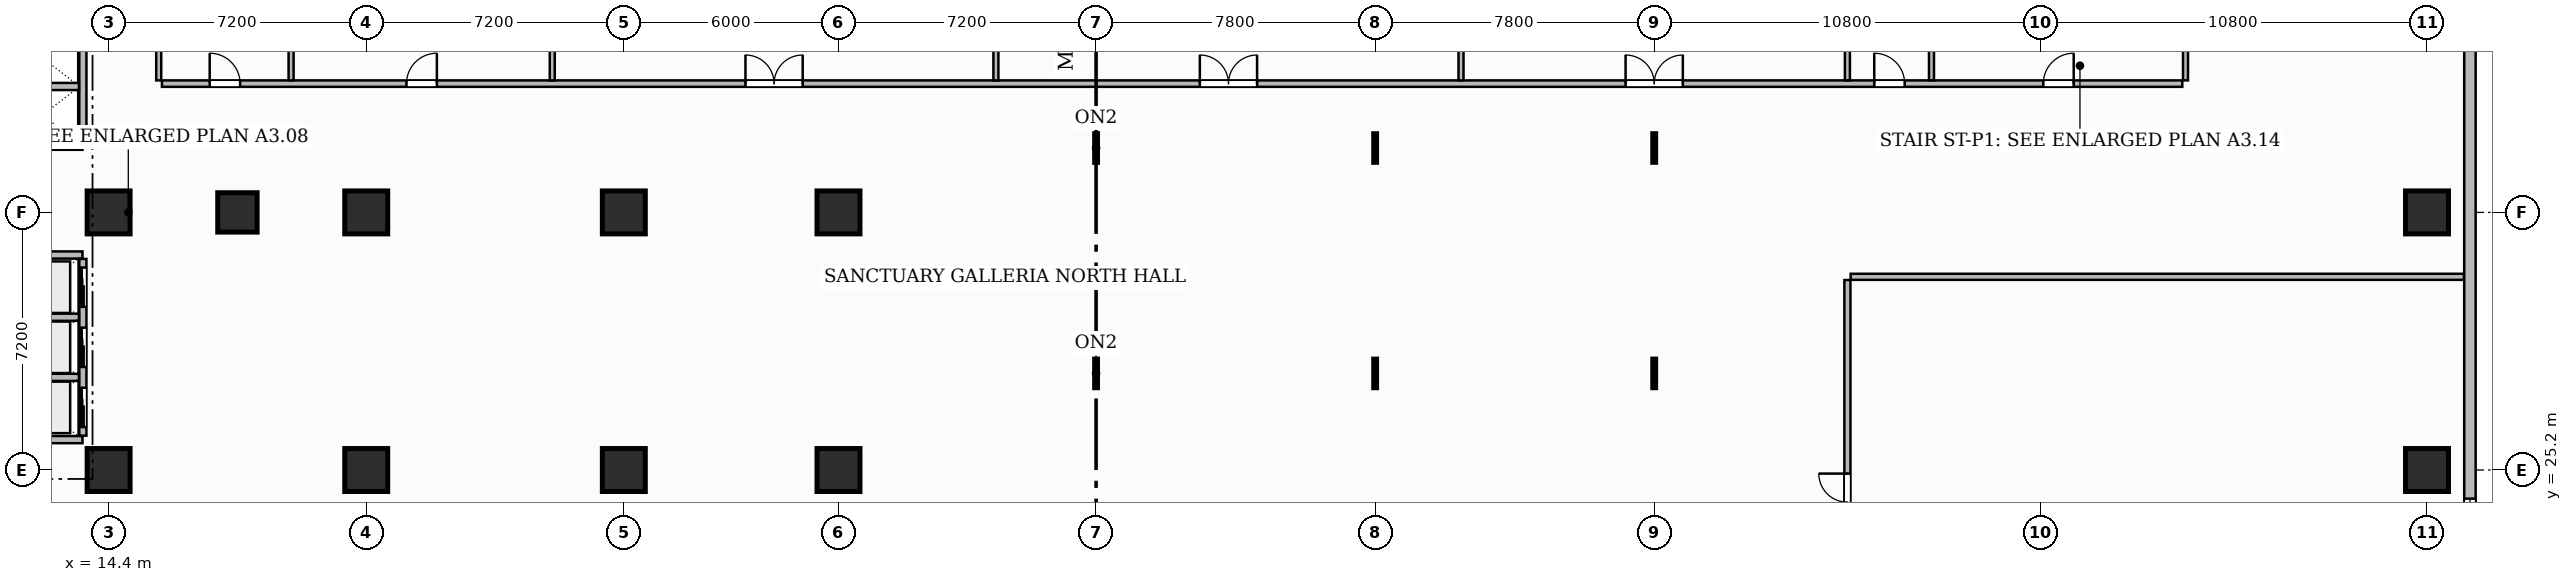
"""IFC4 building model, lengths in metres.
Left out: names, types, materials, properties, quantities, classifications, styles, units other than length and angle.
Written with IfcOpenShell. Run it as: python <this file> out.ifc"""

import sys

from ifc_helpers import new_model, si_unit, direction, frame, frame_2d, origin, origin_2d, place, context, subcontext, project, spatial, rectangle, extrude, source, transform, mapped, element, fill, save


model = new_model("IFC4")
c1 = context("Model", 3, precision=1e-05, world=origin(), true_north=direction((0.0, 1.0)))
c2 = subcontext(c1, "Body", "Model", "MODEL_VIEW")
j1 = project(units=[si_unit("LENGTHUNIT", "METRE"), si_unit("PLANEANGLEUNIT", "RADIAN")], contexts=[c1])
p1 = place(None, origin())
s1 = spatial("IfcSite", under=j1, at=p1, CompositionType="ELEMENT")
p2 = place(p1, origin())
s2 = spatial("IfcBuilding", under=s1, at=p2, CompositionType="ELEMENT")
p3 = place(p2, frame((0.0, 0.0, 21.6)))
s3 = spatial("IfcBuildingStorey", under=s2, at=p3, CompositionType="ELEMENT", Elevation=21.6)
m1 = source(origin(), c2, "Body", "SweptSolid", [
    extrude(rectangle(XDim=1.2, YDim=1.2, at=origin_2d()), origin(), (0.0, 0.0, 1.0), 5.4),
])
for number, where, z_axis, x_axis in (
    (1, (14.4, 25.2, 0.0), (0.0, 0.0, 1.0), (1.0, 0.0, 0.0)),
    (2, (14.4, 32.4, 0.0), (0.0, 0.0, 1.0), (1.0, 0.0, 0.0)),
    (3, (21.6, 25.2, 0.0), (0.0, 0.0, 1.0), (1.0, 0.0, 0.0)),
    (4, (21.6, 32.4, 0.0), (0.0, 0.0, 1.0), (1.0, 0.0, 0.0)),
    (5, (28.8, 25.2, 0.0), (0.0, 0.0, 1.0), (1.0, 0.0, 0.0)),
    (6, (28.8, 32.4, 0.0), (0.0, 0.0, 1.0), (1.0, 0.0, 0.0)),
    (7, (34.8, 25.2, 0.0), (0.0, 0.0, 1.0), (1.0, 0.0, 0.0)),
    (8, (34.8, 32.4, 0.0), (0.0, 0.0, 1.0), (1.0, 0.0, 0.0)),
    (9, (79.2, 25.2, 0.0), (0.0, 0.0, 1.0), (1.0, 0.0, 0.0)),
    (10, (79.2, 32.4, 0.0), (0.0, 0.0, 1.0), (1.0, 0.0, 0.0)),
):
    element("IfcColumn", number, at=place(p3, frame(where, z_axis=z_axis, x_axis=x_axis)), inside=s3, PredefinedType="COLUMN", context=c2, shape_type="MappedRepresentation", body=[
        mapped(m1, transform((0.0, 0.0, 0.0), scale=1.0)),
    ])
m2 = source(origin(), c2, "Body", "SweptSolid", [
    extrude(rectangle(XDim=1.1, YDim=1.1, at=origin_2d()), origin(), (0.0, 0.0, 1.0), 5.4),
])
p4 = place(p3, frame((18.0, 32.4, 0.0), z_axis=(0.0, 0.0, 1.0), x_axis=(1.0, 0.0, 0.0)))
e11 = element("IfcColumn", 11, at=p4, inside=s3, PredefinedType="COLUMN", context=c2, shape_type="MappedRepresentation", body=[
    mapped(m2, transform((0.0, 0.0, 0.0), scale=1.0)),
])
for number, where, z_axis, x_axis in (
    (12, (11.71, 26.05, 0.0), (0.0, 0.0, 1.0), (1.0, 0.0, 0.0)),
    (13, (11.71, 31.21, 0.0), (0.0, 0.0, 1.0), (1.0, 0.0, 0.0)),
):
    element("IfcWall", number, at=place(p3, frame(where, z_axis=z_axis, x_axis=x_axis)), inside=s3, PredefinedType="PARTITIONING", context=c2, shape_type="SweptSolid", body=[
        extrude(rectangle(XDim=1.96, YDim=0.2, at=frame_2d((0.98, 0.0))), origin(), (0.0, 0.0, 1.0), 5.1),
    ])
p5 = place(p3, frame((13.68, 26.16, 0.0), z_axis=(0.0, 0.0, 1.0), x_axis=(0.0, 1.0, 0.0)))
e14 = element("IfcWall", 14, at=p5, inside=s3, PredefinedType="PARTITIONING", context=c2, shape_type="SweptSolid", body=[
    extrude(rectangle(XDim=4.94, YDim=0.2, at=frame_2d((2.47, 0.0))), origin(), (0.0, 0.0, 1.0), 5.1),
])
p6 = place(p5, frame((0.24, 0.0, 0.0)))
e15 = element("IfcOpeningElement", 15, at=p6, cuts=e14, PredefinedType="OPENING", context=c2, shape_type="SweptSolid", body=[
    extrude(rectangle(XDim=1.1, YDim=2.2, at=frame_2d((0.55, 1.1))), frame((0.0, 0.11, 0.0), z_axis=(0.0, -1.0, 0.0), x_axis=(1.0, 0.0, 0.0)), (0.0, 0.0, 1.0), 0.22),
])
p7 = place(p5, frame((1.92, 0.0, 0.0)))
e16 = element("IfcOpeningElement", 16, at=p7, cuts=e14, PredefinedType="OPENING", context=c2, shape_type="SweptSolid", body=[
    extrude(rectangle(XDim=1.1, YDim=2.2, at=frame_2d((0.55, 1.1))), frame((0.0, 0.11, 0.0), z_axis=(0.0, -1.0, 0.0), x_axis=(1.0, 0.0, 0.0)), (0.0, 0.0, 1.0), 0.22),
])
p8 = place(p5, frame((3.6, 0.0, 0.0)))
e17 = element("IfcOpeningElement", 17, at=p8, cuts=e14, PredefinedType="OPENING", context=c2, shape_type="SweptSolid", body=[
    extrude(rectangle(XDim=1.1, YDim=2.2, at=frame_2d((0.55, 1.1))), frame((0.0, 0.11, 0.0), z_axis=(0.0, -1.0, 0.0), x_axis=(1.0, 0.0, 0.0)), (0.0, 0.0, 1.0), 0.22),
])
for number, where, z_axis, x_axis in (
    (18, (11.81, 27.79, 0.0), (0.0, 0.0, 1.0), (1.0, 0.0, 0.0)),
    (19, (11.81, 29.47, 0.0), (0.0, 0.0, 1.0), (1.0, 0.0, 0.0)),
):
    element("IfcWall", number, at=place(p3, frame(where, z_axis=z_axis, x_axis=x_axis)), inside=s3, PredefinedType="PARTITIONING", context=c2, shape_type="SweptSolid", body=[
        extrude(rectangle(XDim=1.76, YDim=0.2, at=frame_2d((0.88, 0.0))), origin(), (0.0, 0.0, 1.0), 5.1),
    ])
p9 = place(p3, frame((11.71, 34.25, 0.0), z_axis=(0.0, 0.0, 1.0), x_axis=(1.0, 0.0, 0.0)))
e20 = element("IfcWall", 20, at=p9, inside=s3, PredefinedType="PARTITIONING", context=c2, shape_type="SweptSolid", body=[
    extrude(rectangle(XDim=1.96, YDim=0.2, at=frame_2d((0.98, 0.0))), origin(), (0.0, 0.0, 1.0), 5.1),
])
p10 = place(p3, frame((13.68, 34.36, 0.0), z_axis=(0.0, 0.0, 1.0), x_axis=(0.0, 1.0, 0.0)))
e21 = element("IfcWall", 21, at=p10, inside=s3, PredefinedType="PARTITIONING", context=c2, shape_type="SweptSolid", body=[
    extrude(rectangle(XDim=4.72, YDim=0.2, at=frame_2d((2.36, 0.0))), origin(), (0.0, 0.0, 1.0), 5.1),
])
p11 = place(p3, frame((11.81, 35.92, 0.0), z_axis=(0.0, 0.0, 1.0), x_axis=(1.0, 0.0, 0.0)))
e22 = element("IfcWall", 22, at=p11, inside=s3, PredefinedType="PARTITIONING", context=c2, shape_type="SweptSolid", body=[
    extrude(rectangle(XDim=1.76, YDim=0.2, at=frame_2d((0.88, 0.0))), origin(), (0.0, 0.0, 1.0), 5.1),
])
p12 = place(p3, frame((15.8, 36.09, 0.0), z_axis=(0.0, 0.0, 1.0), x_axis=(0.0, 1.0, 0.0)))
e23 = element("IfcWall", 23, at=p12, inside=s3, PredefinedType="PARTITIONING", context=c2, shape_type="SweptSolid", body=[
    extrude(rectangle(XDim=10.542, YDim=0.14, at=frame_2d((5.271, 0.0))), origin(), (0.0, 0.0, 1.0), 5.1),
])
p13 = place(p3, frame((72.45, 36.09, 0.0), z_axis=(0.0, 0.0, 1.0), x_axis=(0.0, 1.0, 0.0)))
e24 = element("IfcWall", 24, at=p13, inside=s3, PredefinedType="PARTITIONING", context=c2, shape_type="SweptSolid", body=[
    extrude(rectangle(XDim=3.29, YDim=0.14, at=frame_2d((1.645, 0.0))), origin(), (0.0, 0.0, 1.0), 5.1),
])
p14 = place(p3, frame((15.89, 36.0, 0.0), z_axis=(0.0, 0.0, 1.0), x_axis=(1.0, 0.0, 0.0)))
e25 = element("IfcWall", 25, at=p14, inside=s3, PredefinedType="PARTITIONING", context=c2, shape_type="SweptSolid", body=[
    extrude(rectangle(XDim=56.47, YDim=0.18, at=frame_2d((28.235, 0.0))), origin(), (0.0, 0.0, 1.0), 2.85),
])
p15 = place(p14, frame((1.335, 0.0, 0.0)))
e26 = element("IfcOpeningElement", 26, at=p15, cuts=e25, PredefinedType="OPENING", context=c2, shape_type="SweptSolid", body=[
    extrude(rectangle(XDim=0.85, YDim=2.1, at=frame_2d((0.425, 1.05))), frame((0.0, 0.1, 0.0), z_axis=(0.0, -1.0, 0.0), x_axis=(1.0, 0.0, 0.0)), (0.0, 0.0, 1.0), 0.2),
])
p16 = place(p14, frame((6.835, 0.0, 0.0)))
e27 = element("IfcOpeningElement", 27, at=p16, cuts=e25, PredefinedType="OPENING", context=c2, shape_type="SweptSolid", body=[
    extrude(rectangle(XDim=0.85, YDim=2.1, at=frame_2d((0.425, 1.05))), frame((0.0, 0.1, 0.0), z_axis=(0.0, -1.0, 0.0), x_axis=(1.0, 0.0, 0.0)), (0.0, 0.0, 1.0), 0.2),
])
p17 = place(p14, frame((16.31, 0.0, 0.0)))
e28 = element("IfcOpeningElement", 28, at=p17, cuts=e25, PredefinedType="OPENING", context=c2, shape_type="SweptSolid", body=[
    extrude(rectangle(XDim=1.6, YDim=2.4, at=frame_2d((0.8, 1.2))), frame((0.0, 0.1, 0.0), z_axis=(0.0, -1.0, 0.0), x_axis=(1.0, 0.0, 0.0)), (0.0, 0.0, 1.0), 0.2),
])
p18 = place(p14, frame((29.01, 0.0, 0.0)))
e29 = element("IfcOpeningElement", 29, at=p18, cuts=e25, PredefinedType="OPENING", context=c2, shape_type="SweptSolid", body=[
    extrude(rectangle(XDim=1.6, YDim=2.4, at=frame_2d((0.8, 1.2))), frame((0.0, 0.1, 0.0), z_axis=(0.0, -1.0, 0.0), x_axis=(1.0, 0.0, 0.0)), (0.0, 0.0, 1.0), 0.2),
])
p19 = place(p14, frame((40.91, 0.0, 0.0)))
e30 = element("IfcOpeningElement", 30, at=p19, cuts=e25, PredefinedType="OPENING", context=c2, shape_type="SweptSolid", body=[
    extrude(rectangle(XDim=1.6, YDim=2.4, at=frame_2d((0.8, 1.2))), frame((0.0, 0.1, 0.0), z_axis=(0.0, -1.0, 0.0), x_axis=(1.0, 0.0, 0.0)), (0.0, 0.0, 1.0), 0.2),
])
p20 = place(p14, frame((47.86, 0.0, 0.0)))
e31 = element("IfcOpeningElement", 31, at=p20, cuts=e25, PredefinedType="OPENING", context=c2, shape_type="SweptSolid", body=[
    extrude(rectangle(XDim=0.85, YDim=2.1, at=frame_2d((0.425, 1.05))), frame((0.0, 0.1, 0.0), z_axis=(0.0, -1.0, 0.0), x_axis=(1.0, 0.0, 0.0)), (0.0, 0.0, 1.0), 0.2),
])
p21 = place(p14, frame((52.585, 0.0, 0.0)))
e32 = element("IfcOpeningElement", 32, at=p21, cuts=e25, PredefinedType="OPENING", context=c2, shape_type="SweptSolid", body=[
    extrude(rectangle(XDim=0.85, YDim=2.1, at=frame_2d((0.425, 1.05))), frame((0.0, 0.1, 0.0), z_axis=(0.0, -1.0, 0.0), x_axis=(1.0, 0.0, 0.0)), (0.0, 0.0, 1.0), 0.2),
])
for number, where, z_axis, x_axis in (
    (33, (19.5, 36.09, 0.0), (0.0, 0.0, 1.0), (0.0, 1.0, 0.0)),
    (34, (26.8, 36.09, 0.0), (0.0, 0.0, 1.0), (0.0, 1.0, 0.0)),
):
    element("IfcWall", number, at=place(p3, frame(where, z_axis=z_axis, x_axis=x_axis)), inside=s3, PredefinedType="PARTITIONING", context=c2, shape_type="SweptSolid", body=[
        extrude(rectangle(XDim=10.542, YDim=0.14, at=frame_2d((5.271, 0.0))), origin(), (0.0, 0.0, 1.0), 5.1),
    ])
p22 = place(p3, frame((39.2, 36.09, 0.0), z_axis=(0.0, 0.0, 1.0), x_axis=(0.0, 1.0, 0.0)))
e35 = element("IfcWall", 35, at=p22, inside=s3, PredefinedType="PARTITIONING", context=c2, shape_type="SweptSolid", body=[
    extrude(rectangle(XDim=10.682, YDim=0.14, at=frame_2d((5.341, 0.0))), origin(), (0.0, 0.0, 1.0), 5.1),
])
for number, where, z_axis, x_axis in (
    (36, (52.2, 36.09, 0.0), (0.0, 0.0, 1.0), (0.0, 1.0, 0.0)),
    (37, (63.0, 36.09, 0.0), (0.0, 0.0, 1.0), (0.0, 1.0, 0.0)),
    (38, (65.35, 36.09, 0.0), (0.0, 0.0, 1.0), (0.0, 1.0, 0.0)),
):
    element("IfcWall", number, at=place(p3, frame(where, z_axis=z_axis, x_axis=x_axis)), inside=s3, PredefinedType="PARTITIONING", context=c2, shape_type="SweptSolid", body=[
        extrude(rectangle(XDim=10.542, YDim=0.14, at=frame_2d((5.271, 0.0))), origin(), (0.0, 0.0, 1.0), 5.1),
    ])
p23 = place(p3, frame((63.0, 18.09, 0.0), z_axis=(0.0, 0.0, 1.0), x_axis=(0.0, 1.0, 0.0)))
e39 = element("IfcWall", 39, at=p23, inside=s3, PredefinedType="PARTITIONING", context=c2, shape_type="SweptSolid", body=[
    extrude(rectangle(XDim=12.42, YDim=0.17, at=frame_2d((6.21, 0.0))), origin(), (0.0, 0.0, 1.0), 5.1),
])
p24 = place(p23, frame((5.41, 0.0, 0.0)))
e40 = element("IfcOpeningElement", 40, at=p24, cuts=e39, PredefinedType="OPENING", context=c2, shape_type="SweptSolid", body=[
    extrude(rectangle(XDim=1.6, YDim=2.4, at=frame_2d((0.8, 1.2))), frame((0.0, 0.095, 0.0), z_axis=(0.0, -1.0, 0.0), x_axis=(1.0, 0.0, 0.0)), (0.0, 0.0, 1.0), 0.19),
])
p25 = place(p3, frame((63.09, 30.6, 0.0), z_axis=(0.0, 0.0, 1.0), x_axis=(1.0, 0.0, 0.0)))
e41 = element("IfcWall", 41, at=p25, inside=s3, PredefinedType="PARTITIONING", context=c2, shape_type="SweptSolid", body=[
    extrude(rectangle(XDim=17.142, YDim=0.17, at=frame_2d((8.571, 0.0))), origin(), (0.0, 0.0, 1.0), 5.1),
])
p26 = place(p3, frame((80.4, 0.05, 0.0), z_axis=(0.0, 0.0, 1.0), x_axis=(0.0, 1.0, 0.0)))
e42 = element("IfcWall", 42, at=p26, inside=s3, PredefinedType="SOLIDWALL", context=c2, shape_type="SweptSolid", body=[
    extrude(rectangle(XDim=46.7, YDim=0.32, at=frame_2d((23.35, 0.0))), origin(), (0.0, 0.0, 1.0), 5.1),
])
p27 = place(p26, frame((22.35, 0.0, 0.75)))
e43 = element("IfcOpeningElement", 43, at=p27, cuts=e42, PredefinedType="OPENING", context=c2, shape_type="SweptSolid", body=[
    extrude(rectangle(XDim=2.0, YDim=2.6, at=frame_2d((1.0, 1.3))), frame((0.0, 0.17, 0.0), z_axis=(0.0, -1.0, 0.0), x_axis=(1.0, 0.0, 0.0)), (0.0, 0.0, 1.0), 0.34),
])
m3 = source(origin(), c2, "Body", "SweptSolid", [
    extrude(rectangle(XDim=0.85, YDim=2.1, at=frame_2d((0.425, 1.05))), frame((0.0, 0.025, 0.0), z_axis=(0.0, -1.0, 0.0), x_axis=(1.0, 0.0, 0.0)), (0.0, 0.0, 1.0), 0.05),
])
p28 = place(p15, origin())
e44 = element("IfcDoor", 44, at=p28, inside=s3, OperationType="SINGLE_SWING_LEFT", PredefinedType="DOOR", context=c2, shape_type="MappedRepresentation", body=[
    mapped(m3, transform((0.0, 0.0, 0.0), scale=1.0)),
])
fill(e26, e44)
p29 = place(p16, origin())
e45 = element("IfcDoor", 45, at=p29, inside=s3, OperationType="SINGLE_SWING_RIGHT", PredefinedType="DOOR", context=c2, shape_type="MappedRepresentation", body=[
    mapped(m3, transform((0.0, 0.0, 0.0), scale=1.0)),
])
fill(e27, e45)
m4 = source(origin(), c2, "Body", "SweptSolid", [
    extrude(rectangle(XDim=1.6, YDim=2.4, at=frame_2d((0.8, 1.2))), frame((0.0, 0.025, 0.0), z_axis=(0.0, -1.0, 0.0), x_axis=(1.0, 0.0, 0.0)), (0.0, 0.0, 1.0), 0.05),
])
p30 = place(p17, origin())
e46 = element("IfcDoor", 46, at=p30, inside=s3, OperationType="DOUBLE_DOOR_SINGLE_SWING", PredefinedType="DOOR", context=c2, shape_type="MappedRepresentation", body=[
    mapped(m4, transform((0.0, 0.0, 0.0), scale=1.0)),
])
fill(e28, e46)
p31 = place(p18, origin())
e47 = element("IfcDoor", 47, at=p31, inside=s3, OperationType="DOUBLE_DOOR_SINGLE_SWING", PredefinedType="DOOR", context=c2, shape_type="MappedRepresentation", body=[
    mapped(m4, transform((0.0, 0.0, 0.0), scale=1.0)),
])
fill(e29, e47)
p32 = place(p19, origin())
e48 = element("IfcDoor", 48, at=p32, inside=s3, OperationType="DOUBLE_DOOR_SINGLE_SWING", PredefinedType="DOOR", context=c2, shape_type="MappedRepresentation", body=[
    mapped(m4, transform((0.0, 0.0, 0.0), scale=1.0)),
])
fill(e30, e48)
p33 = place(p20, origin())
e49 = element("IfcDoor", 49, at=p33, inside=s3, OperationType="SINGLE_SWING_LEFT", PredefinedType="DOOR", context=c2, shape_type="MappedRepresentation", body=[
    mapped(m3, transform((0.0, 0.0, 0.0), scale=1.0)),
])
fill(e31, e49)
p34 = place(p21, origin())
e50 = element("IfcDoor", 50, at=p34, inside=s3, OperationType="SINGLE_SWING_RIGHT", PredefinedType="DOOR", context=c2, shape_type="MappedRepresentation", body=[
    mapped(m3, transform((0.0, 0.0, 0.0), scale=1.0)),
])
fill(e32, e50)
p35 = place(p24, origin())
e51 = element("IfcDoor", 51, at=p35, inside=s3, OperationType="DOUBLE_DOOR_SINGLE_SWING", PredefinedType="DOOR", context=c2, shape_type="MappedRepresentation", body=[
    mapped(m4, transform((0.0, 0.0, 0.0), scale=1.0)),
])
fill(e40, e51)
m5 = source(origin(), c2, "Body", "SweptSolid", [
    extrude(rectangle(XDim=1.1, YDim=2.2, at=frame_2d((0.55, 1.1))), frame((0.0, 0.025, 0.0), z_axis=(0.0, -1.0, 0.0), x_axis=(1.0, 0.0, 0.0)), (0.0, 0.0, 1.0), 0.05),
])
p36 = place(p6, origin())
e52 = element("IfcDoor", 52, at=p36, inside=s3, OperationType="SLIDING_TO_LEFT", PredefinedType="DOOR", context=c2, shape_type="MappedRepresentation", body=[
    mapped(m5, transform((0.0, 0.0, 0.0), scale=1.0)),
])
fill(e15, e52)
p37 = place(p7, origin())
e53 = element("IfcDoor", 53, at=p37, inside=s3, OperationType="SLIDING_TO_LEFT", PredefinedType="DOOR", context=c2, shape_type="MappedRepresentation", body=[
    mapped(m5, transform((0.0, 0.0, 0.0), scale=1.0)),
])
fill(e16, e53)
p38 = place(p8, origin())
e54 = element("IfcDoor", 54, at=p38, inside=s3, OperationType="SLIDING_TO_LEFT", PredefinedType="DOOR", context=c2, shape_type="MappedRepresentation", body=[
    mapped(m5, transform((0.0, 0.0, 0.0), scale=1.0)),
])
fill(e17, e54)
m6 = source(origin(), c2, "Body", "SweptSolid", [
    extrude(rectangle(XDim=2.0, YDim=2.6, at=frame_2d((1.0, 1.3))), frame((0.0, 0.03, 0.0), z_axis=(0.0, -1.0, 0.0), x_axis=(1.0, 0.0, 0.0)), (0.0, 0.0, 1.0), 0.06),
])
p39 = place(p27, origin())
e55 = element("IfcWindow", 55, at=p39, inside=s3, PartitioningType="DOUBLE_PANEL_VERTICAL", PredefinedType="WINDOW", context=c2, shape_type="MappedRepresentation", body=[
    mapped(m6, transform((0.0, 0.0, 0.0), scale=1.0)),
])
fill(e43, e55)
save(model, sys.argv[1])
